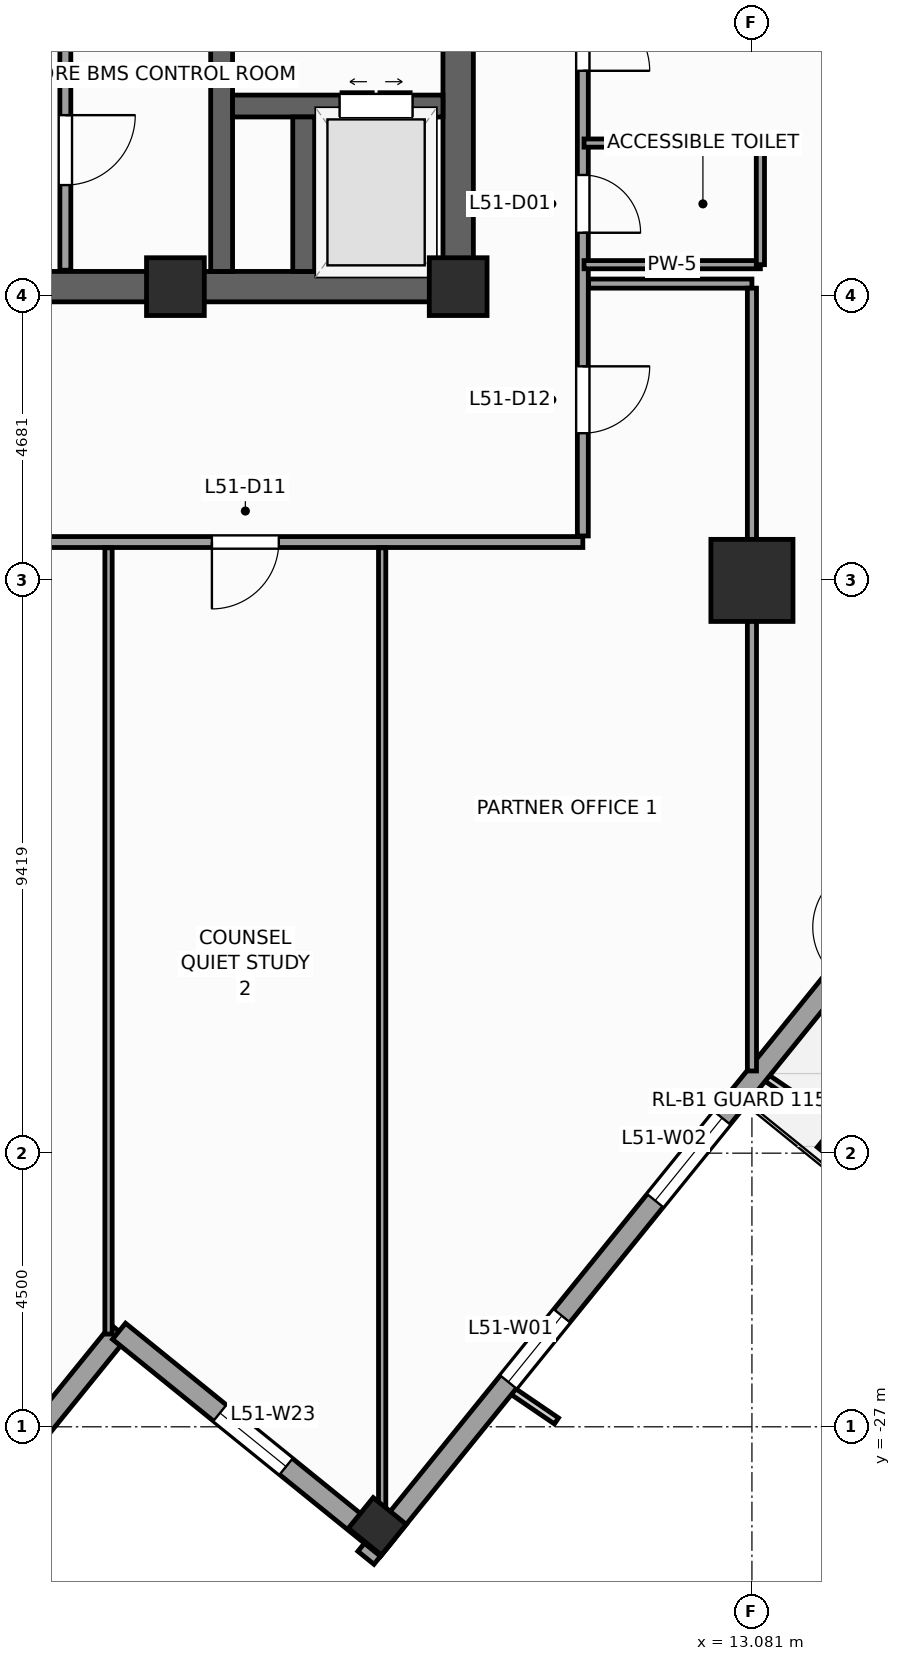
"""IFC4 building model, lengths in metres.
Left out: names, types, materials, properties, quantities, classifications, styles, units other than length and angle.
Written with IfcOpenShell. Run it as: python <this file> out.ifc"""

import sys

from ifc_helpers import new_model, si_unit, direction, frame, frame_2d, origin, origin_2d, place, context, subcontext, project, spatial, rectangle, extrude, source, transform, mapped, element, fill, save


model = new_model("IFC4")
c1 = context("Model", 3, precision=1e-05, world=origin(), true_north=direction((0.0, 1.0)))
c2 = subcontext(c1, "Body", "Model", "MODEL_VIEW")
j1 = project(units=[si_unit("LENGTHUNIT", "METRE"), si_unit("PLANEANGLEUNIT", "RADIAN")], contexts=[c1])
p1 = place(None, origin())
s1 = spatial("IfcSite", under=j1, at=p1, CompositionType="ELEMENT")
p2 = place(p1, origin())
s2 = spatial("IfcBuilding", under=s1, at=p2, CompositionType="ELEMENT")
p3 = place(p2, frame((0.0, 0.0, 213.4)))
s3 = spatial("IfcBuildingStorey", under=s2, at=p3, CompositionType="ELEMENT", Elevation=213.4)
p4 = place(p3, frame((-8.5, -8.25, 0.0), z_axis=(0.0, 0.0, 1.0), x_axis=(1.0, 0.0, 0.0)))
e1 = element("IfcWall", 1, at=p4, inside=s3, PredefinedType="SHEAR", context=c2, shape_type="SweptSolid", body=[
    extrude(rectangle(XDim=17.0, YDim=0.5, at=frame_2d((8.5, 0.0))), origin(), (0.0, 0.0, 1.0), 3.9),
])
p5 = place(p4, frame((7.85, 0.0, 0.0)))
e2 = element("IfcOpeningElement", 2, at=p5, cuts=e1, PredefinedType="OPENING", context=c2, shape_type="SweptSolid", body=[
    extrude(rectangle(XDim=1.3, YDim=2.2, at=frame_2d((0.65, 1.1))), frame((0.0, 0.26, 0.0), z_axis=(0.0, -1.0, 0.0), x_axis=(1.0, 0.0, 0.0)), (0.0, 0.0, 1.0), 0.52),
])
p6 = place(p3, frame((8.25, -8.0, 0.0), z_axis=(0.0, 0.0, 1.0), x_axis=(0.0, 1.0, 0.0)))
e3 = element("IfcWall", 3, at=p6, inside=s3, PredefinedType="SHEAR", context=c2, shape_type="SweptSolid", body=[
    extrude(rectangle(XDim=16.0, YDim=0.5, at=frame_2d((8.0, 0.0))), origin(), (0.0, 0.0, 1.0), 3.9),
])
p7 = place(p6, frame((4.69, 0.0, 0.0)))
e4 = element("IfcOpeningElement", 4, at=p7, cuts=e3, PredefinedType="OPENING", context=c2, shape_type="SweptSolid", body=[
    extrude(rectangle(XDim=1.3, YDim=2.2, at=frame_2d((0.65, 1.1))), frame((0.0, 0.26, 0.0), z_axis=(0.0, -1.0, 0.0), x_axis=(1.0, 0.0, 0.0)), (0.0, 0.0, 1.0), 0.52),
])
p8 = place(p3, frame((4.36, -8.0, 0.0), z_axis=(0.0, 0.0, 1.0), x_axis=(0.0, 1.0, 0.0)))
e5 = element("IfcWall", 5, at=p8, inside=s3, PredefinedType="SHEAR", context=c2, shape_type="SweptSolid", body=[
    extrude(rectangle(XDim=16.0, YDim=0.36, at=frame_2d((8.0, 0.0))), origin(), (0.0, 0.0, 1.0), 3.9),
])
p9 = place(p3, frame((4.54, -5.28, 0.0), z_axis=(0.0, 0.0, 1.0), x_axis=(1.0, 0.0, 0.0)))
e6 = element("IfcWall", 6, at=p9, inside=s3, PredefinedType="SHEAR", context=c2, shape_type="SweptSolid", body=[
    extrude(rectangle(XDim=3.46, YDim=0.36, at=frame_2d((1.73, 0.0))), origin(), (0.0, 0.0, 1.0), 3.9),
])
p10 = place(p9, frame((1.76, 0.0, 0.0)))
e7 = element("IfcOpeningElement", 7, at=p10, cuts=e6, PredefinedType="OPENING", context=c2, shape_type="SweptSolid", body=[
    extrude(rectangle(XDim=1.2, YDim=2.25, at=frame_2d((0.6, 1.125))), frame((0.0, 0.19, 0.0), z_axis=(0.0, -1.0, 0.0), x_axis=(1.0, 0.0, 0.0)), (0.0, 0.0, 1.0), 0.38),
])
p11 = place(p3, frame((5.71, -8.0, 0.0), z_axis=(0.0, 0.0, 1.0), x_axis=(0.0, 1.0, 0.0)))
e8 = element("IfcWall", 8, at=p11, inside=s3, PredefinedType="SHEAR", context=c2, shape_type="SweptSolid", body=[
    extrude(rectangle(XDim=2.54, YDim=0.36, at=frame_2d((1.27, 0.0))), origin(), (0.0, 0.0, 1.0), 3.9),
])
m1 = source(origin(), c2, "Body", "SweptSolid", [
    extrude(rectangle(XDim=0.95, YDim=0.95, at=origin_2d()), origin(), (0.0, 0.0, 1.0), 3.9),
])
for number, where, z_axis, x_axis in (
    (9, (8.25, -8.25, 0.0), (0.0, 0.0, 1.0), (1.0, 0.0, 0.0)),
    (10, (3.6, -8.25, 0.0), (0.0, 0.0, 1.0), (1.0, 0.0, 0.0)),
):
    element("IfcColumn", number, at=place(p3, frame(where, z_axis=z_axis, x_axis=x_axis)), inside=s3, PredefinedType="PILASTER", context=c2, shape_type="MappedRepresentation", body=[
        mapped(m1, transform((0.0, 0.0, 0.0), scale=1.0)),
    ])
m2 = source(origin(), c2, "Body", "SweptSolid", [
    extrude(rectangle(XDim=1.35, YDim=1.35, at=origin_2d()), origin(), (0.0, 0.0, 1.0), 3.9),
])
p12 = place(p3, frame((13.081, -13.081, 0.0), z_axis=(0.0, 0.0, 1.0), x_axis=(1.0, 0.0, 0.0)))
e11 = element("IfcColumn", 11, at=p12, inside=s3, PredefinedType="COLUMN", context=c2, shape_type="MappedRepresentation", body=[
    mapped(m2, transform((0.0, 0.0, 0.0), scale=1.0)),
])
m3 = source(origin(), c2, "Body", "SweptSolid", [
    extrude(rectangle(XDim=0.65, YDim=0.7, at=origin_2d()), origin(), (0.0, 0.0, 1.0), 3.9),
])
p13 = place(p3, frame((6.92, -28.637, 0.0), z_axis=(0.0, 0.0, 1.0), x_axis=(0.62932039105, 0.777145961457, 0.0)))
e12 = element("IfcColumn", 12, at=p13, inside=s3, PredefinedType="COLUMN", context=c2, shape_type="MappedRepresentation", body=[
    mapped(m3, transform((0.0, 0.0, 0.0), scale=1.0)),
])
p14 = place(p3, frame((6.733, -29.154, 0.0), z_axis=(0.0, 0.0, 1.0), x_axis=(0.629325378072, 0.77714192302, 0.0)))
e13 = element("IfcWall", 13, at=p14, inside=s3, PredefinedType="STANDARD", context=c2, shape_type="SweptSolid", body=[
    extrude(rectangle(XDim=36.84, YDim=0.34, at=frame_2d((18.42, 0.0))), origin(), (0.0, 0.0, 1.0), 2.96),
])
p15 = place(p14, frame((12.295, 0.0, 0.0)))
e14 = element("IfcOpeningElement", 14, at=p15, cuts=e13, PredefinedType="OPENING", context=c2, shape_type="SweptSolid", body=[
    extrude(rectangle(XDim=1.05, YDim=2.25, at=frame_2d((0.525, 1.125))), frame((0.0, 0.18, 0.0), z_axis=(0.0, -1.0, 0.0), x_axis=(1.0, 0.0, 0.0)), (0.0, 0.0, 1.0), 0.36),
])
p16 = place(p14, frame((3.721, 0.0, 0.48)))
e15 = element("IfcOpeningElement", 15, at=p16, cuts=e13, PredefinedType="OPENING", context=c2, shape_type="SweptSolid", body=[
    extrude(rectangle(XDim=1.4, YDim=2.4, at=frame_2d((0.7, 1.2))), frame((0.0, 0.18, 0.0), z_axis=(0.0, -1.0, 0.0), x_axis=(1.0, 0.0, 0.0)), (0.0, 0.0, 1.0), 0.36),
])
p17 = place(p14, frame((7.559, 0.0, 0.58)))
e16 = element("IfcOpeningElement", 16, at=p17, cuts=e13, PredefinedType="OPENING", context=c2, shape_type="SweptSolid", body=[
    extrude(rectangle(XDim=1.75, YDim=2.3, at=frame_2d((0.875, 1.15))), frame((0.0, 0.18, 0.0), z_axis=(0.0, -1.0, 0.0), x_axis=(1.0, 0.0, 0.0)), (0.0, 0.0, 1.0), 0.36),
])
p18 = place(p14, frame((16.058, 0.0, 0.58)))
e17 = element("IfcOpeningElement", 17, at=p18, cuts=e13, PredefinedType="OPENING", context=c2, shape_type="SweptSolid", body=[
    extrude(rectangle(XDim=1.75, YDim=2.3, at=frame_2d((0.875, 1.15))), frame((0.0, 0.18, 0.0), z_axis=(0.0, -1.0, 0.0), x_axis=(1.0, 0.0, 0.0)), (0.0, 0.0, 1.0), 0.36),
])
p19 = place(p14, frame((24.176, 0.0, 0.58)))
e18 = element("IfcOpeningElement", 18, at=p19, cuts=e13, PredefinedType="OPENING", context=c2, shape_type="SweptSolid", body=[
    extrude(rectangle(XDim=1.75, YDim=2.3, at=frame_2d((0.875, 1.15))), frame((0.0, 0.18, 0.0), z_axis=(0.0, -1.0, 0.0), x_axis=(1.0, 0.0, 0.0)), (0.0, 0.0, 1.0), 0.36),
])
p20 = place(p14, frame((30.982, 0.0, 0.48)))
e19 = element("IfcOpeningElement", 19, at=p20, cuts=e13, PredefinedType="OPENING", context=c2, shape_type="SweptSolid", body=[
    extrude(rectangle(XDim=1.4, YDim=2.4, at=frame_2d((0.7, 1.2))), frame((0.0, 0.18, 0.0), z_axis=(0.0, -1.0, 0.0), x_axis=(1.0, 0.0, 0.0)), (0.0, 0.0, 1.0), 0.36),
])
p21 = place(p3, frame((-0.789, -29.703, 0.0), z_axis=(0.0, 0.0, 1.0), x_axis=(0.629323365087, 0.77714355312, 0.0)))
e20 = element("IfcWall", 20, at=p21, inside=s3, PredefinedType="STANDARD", context=c2, shape_type="SweptSolid", body=[
    extrude(rectangle(XDim=5.5, YDim=0.34, at=frame_2d((2.75, 0.0))), origin(), (0.0, 0.0, 1.0), 3.66),
])
p22 = place(p3, frame((2.673, -25.429, 0.0), z_axis=(0.0, 0.0, 1.0), x_axis=(0.777162640055, -0.629299794138, 0.0)))
e21 = element("IfcWall", 21, at=p22, inside=s3, PredefinedType="STANDARD", context=c2, shape_type="SweptSolid", body=[
    extrude(rectangle(XDim=5.67, YDim=0.34, at=frame_2d((2.835, 0.0))), origin(), (0.0, 0.0, 1.0), 3.66),
])
p23 = place(p22, frame((2.135, 0.0, 0.48)))
e22 = element("IfcOpeningElement", 22, at=p23, cuts=e21, PredefinedType="OPENING", context=c2, shape_type="SweptSolid", body=[
    extrude(rectangle(XDim=1.4, YDim=2.4, at=frame_2d((0.7, 1.2))), frame((0.0, 0.18, 0.0), z_axis=(0.0, -1.0, 0.0), x_axis=(1.0, 0.0, 0.0)), (0.0, 0.0, 1.0), 0.36),
])
p24 = place(p3, frame((1.79, -7.98, 0.0), z_axis=(0.0, 0.0, 1.0), x_axis=(0.0, 1.0, 0.0)))
e23 = element("IfcWall", 23, at=p24, inside=s3, PredefinedType="PARTITIONING", context=c2, shape_type="SweptSolid", body=[
    extrude(rectangle(XDim=12.38, YDim=0.18, at=frame_2d((6.19, 0.0))), origin(), (0.0, 0.0, 1.0), 3.66),
])
p25 = place(p24, frame((4.6, 0.0, 0.0)))
e24 = element("IfcOpeningElement", 24, at=p25, cuts=e23, PredefinedType="OPENING", context=c2, shape_type="SweptSolid", body=[
    extrude(rectangle(XDim=1.1, YDim=2.2, at=frame_2d((0.55, 1.1))), frame((0.0, 0.1, 0.0), z_axis=(0.0, -1.0, 0.0), x_axis=(1.0, 0.0, 0.0)), (0.0, 0.0, 1.0), 0.2),
])
p26 = place(p24, frame((6.66, 0.0, 0.0)))
e25 = element("IfcOpeningElement", 25, at=p26, cuts=e23, PredefinedType="OPENING", context=c2, shape_type="SweptSolid", body=[
    extrude(rectangle(XDim=1.1, YDim=2.2, at=frame_2d((0.55, 1.1))), frame((0.0, 0.1, 0.0), z_axis=(0.0, -1.0, 0.0), x_axis=(1.0, 0.0, 0.0)), (0.0, 0.0, 1.0), 0.2),
])
p27 = place(p24, frame((1.4, 0.0, 0.0)))
e26 = element("IfcOpeningElement", 26, at=p27, cuts=e23, PredefinedType="OPENING", context=c2, shape_type="SweptSolid", body=[
    extrude(rectangle(XDim=1.15, YDim=2.25, at=frame_2d((0.575, 1.125))), frame((0.0, 0.1, 0.0), z_axis=(0.0, -1.0, 0.0), x_axis=(1.0, 0.0, 0.0)), (0.0, 0.0, 1.0), 0.2),
])
p28 = place(p3, frame((-11.45, -12.45, 0.0), z_axis=(0.0, 0.0, 1.0), x_axis=(1.0, 0.0, 0.0)))
e27 = element("IfcWall", 27, at=p28, inside=s3, PredefinedType="PARTITIONING", context=c2, shape_type="SweptSolid", body=[
    extrude(rectangle(XDim=21.75, YDim=0.18, at=frame_2d((10.875, 0.0))), origin(), (0.0, 0.0, 1.0), 3.66),
])
p29 = place(p28, frame((5.411, 0.0, 0.0)))
e28 = element("IfcOpeningElement", 28, at=p29, cuts=e27, PredefinedType="OPENING", context=c2, shape_type="SweptSolid", body=[
    extrude(rectangle(XDim=0.95, YDim=2.1, at=frame_2d((0.475, 1.05))), frame((0.0, 0.1, 0.0), z_axis=(0.0, -1.0, 0.0), x_axis=(1.0, 0.0, 0.0)), (0.0, 0.0, 1.0), 0.2),
])
p30 = place(p28, frame((1.839, 0.0, 0.0)))
e29 = element("IfcOpeningElement", 29, at=p30, cuts=e27, PredefinedType="OPENING", context=c2, shape_type="SweptSolid", body=[
    extrude(rectangle(XDim=1.1, YDim=2.2, at=frame_2d((0.55, 1.1))), frame((0.0, 0.1, 0.0), z_axis=(0.0, -1.0, 0.0), x_axis=(1.0, 0.0, 0.0)), (0.0, 0.0, 1.0), 0.2),
])
p31 = place(p28, frame((7.574, 0.0, 0.0)))
e30 = element("IfcOpeningElement", 30, at=p31, cuts=e27, PredefinedType="OPENING", context=c2, shape_type="SweptSolid", body=[
    extrude(rectangle(XDim=1.1, YDim=2.2, at=frame_2d((0.55, 1.1))), frame((0.0, 0.1, 0.0), z_axis=(0.0, -1.0, 0.0), x_axis=(1.0, 0.0, 0.0)), (0.0, 0.0, 1.0), 0.2),
])
p32 = place(p28, frame((11.05, 0.0, 0.0)))
e31 = element("IfcOpeningElement", 31, at=p32, cuts=e27, PredefinedType="OPENING", context=c2, shape_type="SweptSolid", body=[
    extrude(rectangle(XDim=1.1, YDim=2.2, at=frame_2d((0.55, 1.1))), frame((0.0, 0.1, 0.0), z_axis=(0.0, -1.0, 0.0), x_axis=(1.0, 0.0, 0.0)), (0.0, 0.0, 1.0), 0.2),
])
p33 = place(p28, frame((15.65, 0.0, 0.0)))
e32 = element("IfcOpeningElement", 32, at=p33, cuts=e27, PredefinedType="OPENING", context=c2, shape_type="SweptSolid", body=[
    extrude(rectangle(XDim=1.1, YDim=2.2, at=frame_2d((0.55, 1.1))), frame((0.0, 0.1, 0.0), z_axis=(0.0, -1.0, 0.0), x_axis=(1.0, 0.0, 0.0)), (0.0, 0.0, 1.0), 0.2),
])
p34 = place(p3, frame((10.3, -12.35, 0.0), z_axis=(0.0, 0.0, 1.0), x_axis=(0.0, 1.0, 0.0)))
e33 = element("IfcWall", 33, at=p34, inside=s3, PredefinedType="PARTITIONING", context=c2, shape_type="SweptSolid", body=[
    extrude(rectangle(XDim=16.15, YDim=0.18, at=frame_2d((8.075, 0.0))), origin(), (0.0, 0.0, 1.0), 3.66),
])
p35 = place(p34, frame((4.986, 0.0, 0.0)))
e34 = element("IfcOpeningElement", 34, at=p35, cuts=e33, PredefinedType="OPENING", context=c2, shape_type="SweptSolid", body=[
    extrude(rectangle(XDim=0.95, YDim=2.1, at=frame_2d((0.475, 1.05))), frame((0.0, 0.1, 0.0), z_axis=(0.0, -1.0, 0.0), x_axis=(1.0, 0.0, 0.0)), (0.0, 0.0, 1.0), 0.2),
])
p36 = place(p34, frame((14.111, 0.0, 0.0)))
e35 = element("IfcOpeningElement", 35, at=p36, cuts=e33, PredefinedType="OPENING", context=c2, shape_type="SweptSolid", body=[
    extrude(rectangle(XDim=1.1, YDim=2.2, at=frame_2d((0.55, 1.1))), frame((0.0, 0.1, 0.0), z_axis=(0.0, -1.0, 0.0), x_axis=(1.0, 0.0, 0.0)), (0.0, 0.0, 1.0), 0.2),
])
p37 = place(p34, frame((1.689, 0.0, 0.0)))
e36 = element("IfcOpeningElement", 36, at=p37, cuts=e33, PredefinedType="OPENING", context=c2, shape_type="SweptSolid", body=[
    extrude(rectangle(XDim=1.1, YDim=2.2, at=frame_2d((0.55, 1.1))), frame((0.0, 0.1, 0.0), z_axis=(0.0, -1.0, 0.0), x_axis=(1.0, 0.0, 0.0)), (0.0, 0.0, 1.0), 0.2),
])
p38 = place(p34, frame((7.65, 0.0, 0.0)))
e37 = element("IfcOpeningElement", 37, at=p38, cuts=e33, PredefinedType="OPENING", context=c2, shape_type="SweptSolid", body=[
    extrude(rectangle(XDim=1.1, YDim=2.2, at=frame_2d((0.55, 1.1))), frame((0.0, 0.1, 0.0), z_axis=(0.0, -1.0, 0.0), x_axis=(1.0, 0.0, 0.0)), (0.0, 0.0, 1.0), 0.2),
])
p39 = place(p34, frame((11.175, 0.0, 0.0)))
e38 = element("IfcOpeningElement", 38, at=p39, cuts=e33, PredefinedType="OPENING", context=c2, shape_type="SweptSolid", body=[
    extrude(rectangle(XDim=1.1, YDim=2.2, at=frame_2d((0.55, 1.1))), frame((0.0, 0.1, 0.0), z_axis=(0.0, -1.0, 0.0), x_axis=(1.0, 0.0, 0.0)), (0.0, 0.0, 1.0), 0.2),
])
p40 = place(p3, frame((2.5, -25.475, 0.0), z_axis=(0.0, 0.0, 1.0), x_axis=(0.0, 1.0, 0.0)))
e39 = element("IfcWall", 39, at=p40, inside=s3, PredefinedType="PARTITIONING", context=c2, shape_type="SweptSolid", body=[
    extrude(rectangle(XDim=12.93, YDim=0.12, at=frame_2d((6.465, 0.0))), origin(), (0.0, 0.0, 1.0), 3.66),
])
p41 = place(p3, frame((7.0, -28.658, 0.0), z_axis=(0.0, 0.0, 1.0), x_axis=(0.0, 1.0, 0.0)))
e40 = element("IfcWall", 40, at=p41, inside=s3, PredefinedType="PARTITIONING", context=c2, shape_type="SweptSolid", body=[
    extrude(rectangle(XDim=16.113, YDim=0.12, at=frame_2d((8.057, 0.0))), origin(), (0.0, 0.0, 1.0), 2.96),
])
p42 = place(p3, frame((10.395, -8.2, 0.0), z_axis=(0.0, 0.0, 1.0), x_axis=(1.0, 0.0, 0.0)))
e41 = element("IfcWall", 41, at=p42, inside=s3, PredefinedType="PARTITIONING", context=c2, shape_type="SweptSolid", body=[
    extrude(rectangle(XDim=2.686, YDim=0.15, at=frame_2d((1.343, 0.0))), origin(), (0.0, 0.0, 1.0), 3.66),
])
p43 = place(p3, frame((13.081, -8.275, 0.0), z_axis=(0.0, 0.0, 1.0), x_axis=(0.0, -1.0, 0.0)))
e42 = element("IfcWall", 42, at=p43, inside=s3, PredefinedType="PARTITIONING", context=c2, shape_type="SweptSolid", body=[
    extrude(rectangle(XDim=12.874, YDim=0.15, at=frame_2d((6.437, 0.0))), origin(), (0.0, 0.0, 1.0), 2.76),
])
p44 = place(p3, frame((10.32, -7.889, 0.0), z_axis=(0.0, 0.0, 1.0), x_axis=(1.0, 0.0, 0.0)))
e43 = element("IfcWall", 43, at=p44, inside=s3, PredefinedType="PARTITIONING", context=c2, shape_type="SweptSolid", body=[
    extrude(rectangle(XDim=2.9, YDim=0.135, at=frame_2d((1.45, 0.0))), origin(), (0.0, 0.0, 1.0), 3.66),
])
p45 = place(p3, frame((13.22, -7.889, 0.0), z_axis=(0.0, 0.0, 1.0), x_axis=(0.0, 1.0, 0.0)))
e44 = element("IfcWall", 44, at=p45, inside=s3, PredefinedType="PARTITIONING", context=c2, shape_type="SweptSolid", body=[
    extrude(rectangle(XDim=2.0, YDim=0.135, at=frame_2d((1.0, 0.0))), origin(), (0.0, 0.0, 1.0), 2.76),
])
p46 = place(p3, frame((10.32, -5.889, 0.0), z_axis=(0.0, 0.0, 1.0), x_axis=(1.0, 0.0, 0.0)))
e45 = element("IfcWall", 45, at=p46, inside=s3, PredefinedType="PARTITIONING", context=c2, shape_type="SweptSolid", body=[
    extrude(rectangle(XDim=2.9, YDim=0.135, at=frame_2d((1.45, 0.0))), origin(), (0.0, 0.0, 1.0), 3.66),
])
m4 = source(origin(), c2, "Body", "SweptSolid", [
    extrude(rectangle(XDim=1.4, YDim=2.4, at=frame_2d((0.7, 1.2))), frame((0.0, 0.03, 0.0), z_axis=(0.0, -1.0, 0.0), x_axis=(1.0, 0.0, 0.0)), (0.0, 0.0, 1.0), 0.06),
])
p47 = place(p16, origin())
e46 = element("IfcWindow", 46, at=p47, inside=s3, PartitioningType="SINGLE_PANEL", PredefinedType="WINDOW", context=c2, shape_type="MappedRepresentation", body=[
    mapped(m4, transform((0.0, 0.0, 0.0), scale=1.0)),
])
fill(e15, e46)
m5 = source(origin(), c2, "Body", "SweptSolid", [
    extrude(rectangle(XDim=1.75, YDim=2.3, at=frame_2d((0.875, 1.15))), frame((0.0, 0.03, 0.0), z_axis=(0.0, -1.0, 0.0), x_axis=(1.0, 0.0, 0.0)), (0.0, 0.0, 1.0), 0.06),
])
p48 = place(p17, origin())
e47 = element("IfcWindow", 47, at=p48, inside=s3, PartitioningType="SINGLE_PANEL", PredefinedType="WINDOW", context=c2, shape_type="MappedRepresentation", body=[
    mapped(m5, transform((0.0, 0.0, 0.0), scale=1.0)),
])
fill(e16, e47)
p49 = place(p23, origin())
e48 = element("IfcWindow", 48, at=p49, inside=s3, PartitioningType="SINGLE_PANEL", PredefinedType="WINDOW", context=c2, shape_type="MappedRepresentation", body=[
    mapped(m4, transform((0.0, 0.0, 0.0), scale=1.0)),
])
fill(e22, e48)
m6 = source(origin(), c2, "Body", "SweptSolid", [
    extrude(rectangle(XDim=1.2, YDim=2.25, at=frame_2d((0.6, 1.125))), frame((0.0, 0.025, 0.0), z_axis=(0.0, -1.0, 0.0), x_axis=(1.0, 0.0, 0.0)), (0.0, 0.0, 1.0), 0.05),
])
p50 = place(p10, origin())
e49 = element("IfcDoor", 49, at=p50, inside=s3, OperationType="DOUBLE_DOOR_SLIDING", PredefinedType="DOOR", context=c2, shape_type="MappedRepresentation", body=[
    mapped(m6, transform((0.0, 0.0, 0.0), scale=1.0)),
])
fill(e7, e49)
m7 = source(origin(), c2, "Body", "SweptSolid", [
    extrude(rectangle(XDim=1.15, YDim=2.25, at=frame_2d((0.575, 1.125))), frame((0.0, 0.025, 0.0), z_axis=(0.0, -1.0, 0.0), x_axis=(1.0, 0.0, 0.0)), (0.0, 0.0, 1.0), 0.05),
])
p51 = place(p27, frame((1.15, 0.0, 0.0), z_axis=(0.0, 0.0, 1.0), x_axis=(-1.0, 0.0, 0.0)))
e50 = element("IfcDoor", 50, at=p51, inside=s3, OperationType="SINGLE_SWING_RIGHT", PredefinedType="DOOR", context=c2, shape_type="MappedRepresentation", body=[
    mapped(m7, transform((0.0, 0.0, 0.0), scale=1.0)),
])
fill(e26, e50)
m8 = source(origin(), c2, "Body", "SweptSolid", [
    extrude(rectangle(XDim=0.95, YDim=2.1, at=frame_2d((0.475, 1.05))), frame((0.0, 0.025, 0.0), z_axis=(0.0, -1.0, 0.0), x_axis=(1.0, 0.0, 0.0)), (0.0, 0.0, 1.0), 0.05),
])
p52 = place(p35, frame((0.95, 0.0, 0.0), z_axis=(0.0, 0.0, 1.0), x_axis=(-1.0, 0.0, 0.0)))
e51 = element("IfcDoor", 51, at=p52, inside=s3, OperationType="SINGLE_SWING_LEFT", PredefinedType="DOOR", context=c2, shape_type="MappedRepresentation", body=[
    mapped(m8, transform((0.0, 0.0, 0.0), scale=1.0)),
])
fill(e34, e51)
m9 = source(origin(), c2, "Body", "SweptSolid", [
    extrude(rectangle(XDim=1.1, YDim=2.2, at=frame_2d((0.55, 1.1))), frame((0.0, 0.025, 0.0), z_axis=(0.0, -1.0, 0.0), x_axis=(1.0, 0.0, 0.0)), (0.0, 0.0, 1.0), 0.05),
])
p53 = place(p33, frame((1.1, 0.0, 0.0), z_axis=(0.0, 0.0, 1.0), x_axis=(-1.0, 0.0, 0.0)))
e52 = element("IfcDoor", 52, at=p53, inside=s3, OperationType="SINGLE_SWING_LEFT", PredefinedType="DOOR", context=c2, shape_type="MappedRepresentation", body=[
    mapped(m9, transform((0.0, 0.0, 0.0), scale=1.0)),
])
fill(e32, e52)
p54 = place(p37, frame((1.1, 0.0, 0.0), z_axis=(0.0, 0.0, 1.0), x_axis=(-1.0, 0.0, 0.0)))
e53 = element("IfcDoor", 53, at=p54, inside=s3, OperationType="SINGLE_SWING_RIGHT", PredefinedType="DOOR", context=c2, shape_type="MappedRepresentation", body=[
    mapped(m9, transform((0.0, 0.0, 0.0), scale=1.0)),
])
fill(e36, e53)
p55 = place(p38, frame((1.1, 0.0, 0.0), z_axis=(0.0, 0.0, 1.0), x_axis=(-1.0, 0.0, 0.0)))
e54 = element("IfcDoor", 54, at=p55, inside=s3, OperationType="SINGLE_SWING_LEFT", PredefinedType="DOOR", context=c2, shape_type="MappedRepresentation", body=[
    mapped(m9, transform((0.0, 0.0, 0.0), scale=1.0)),
])
fill(e37, e54)
save(model, sys.argv[1])
